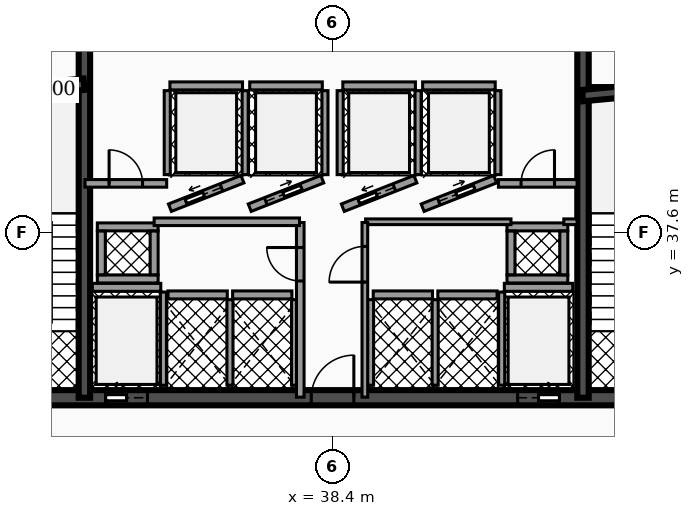
"""IFC4 building model, lengths in metres.
Left out: names, types, materials, properties, quantities, classifications, styles, units other than length and angle.
Written with IfcOpenShell. Run it as: python <this file> out.ifc"""

import sys

from ifc_helpers import new_model, si_unit, direction, frame, frame_2d, origin, place, context, subcontext, project, spatial, rectangle, extrude, element, fill, save


model = new_model("IFC4")
c1 = context("Model", 3, precision=1e-05, world=origin(), true_north=direction((0.0, 1.0)))
c2 = subcontext(c1, "Body", "Model", "MODEL_VIEW")
j1 = project(units=[si_unit("LENGTHUNIT", "METRE"), si_unit("PLANEANGLEUNIT", "RADIAN")], contexts=[c1])
p1 = place(None, origin())
s1 = spatial("IfcSite", under=j1, at=p1, CompositionType="ELEMENT")
p2 = place(p1, origin())
s2 = spatial("IfcBuilding", under=s1, at=p2, CompositionType="ELEMENT")
p3 = place(p2, frame((0.0, 0.0, 84.66)))
s3 = spatial("IfcBuildingStorey", under=s2, at=p3, CompositionType="ELEMENT", Elevation=84.66)
p4 = place(p3, frame((28.4, 33.25, 0.0), z_axis=(0.0, 0.0, 1.0), x_axis=(1.0, 0.0, 0.0)))
e1 = element("IfcWall", 1, at=p4, inside=s3, PredefinedType="SHEAR", context=c2, shape_type="SweptSolid", body=[
    extrude(rectangle(XDim=20.06, YDim=0.4, at=frame_2d((10.03, 0.0))), origin(), (0.0, 0.0, 1.0), 3.82),
])
p5 = place(p4, frame((4.03, 0.0, 0.0)))
e2 = element("IfcOpeningElement", 2, at=p5, cuts=e1, PredefinedType="OPENING", context=c2, shape_type="SweptSolid", body=[
    extrude(rectangle(XDim=1.1, YDim=2.15, at=frame_2d((0.55, 1.075))), frame((0.0, 0.21, 0.0), z_axis=(0.0, -1.0, 0.0), x_axis=(1.0, 0.0, 0.0)), (0.0, 0.0, 1.0), 0.42),
])
p6 = place(p4, frame((14.87, 0.0, 0.0)))
e3 = element("IfcOpeningElement", 3, at=p6, cuts=e1, PredefinedType="OPENING", context=c2, shape_type="SweptSolid", body=[
    extrude(rectangle(XDim=1.1, YDim=2.15, at=frame_2d((0.55, 1.075))), frame((0.0, 0.21, 0.0), z_axis=(0.0, -1.0, 0.0), x_axis=(1.0, 0.0, 0.0)), (0.0, 0.0, 1.0), 0.42),
])
p7 = place(p4, frame((1.31, 0.0, 0.0)))
e4 = element("IfcOpeningElement", 4, at=p7, cuts=e1, PredefinedType="OPENING", context=c2, shape_type="SweptSolid", body=[
    extrude(rectangle(XDim=1.1, YDim=2.2, at=frame_2d((0.55, 1.1))), frame((0.0, 0.21, 0.0), z_axis=(0.0, -1.0, 0.0), x_axis=(1.0, 0.0, 0.0)), (0.0, 0.0, 1.0), 0.42),
])
p8 = place(p4, frame((9.44, 0.0, 0.0)))
e5 = element("IfcOpeningElement", 5, at=p8, cuts=e1, PredefinedType="OPENING", context=c2, shape_type="SweptSolid", body=[
    extrude(rectangle(XDim=1.12, YDim=2.05, at=frame_2d((0.56, 1.025))), frame((0.0, 0.21, 0.0), z_axis=(0.0, -1.0, 0.0), x_axis=(1.0, 0.0, 0.0)), (0.0, 0.0, 1.0), 0.42),
])
p9 = place(p4, frame((17.65, 0.0, 0.0)))
e6 = element("IfcOpeningElement", 6, at=p9, cuts=e1, PredefinedType="OPENING", context=c2, shape_type="SweptSolid", body=[
    extrude(rectangle(XDim=1.1, YDim=2.2, at=frame_2d((0.55, 1.1))), frame((0.0, 0.21, 0.0), z_axis=(0.0, -1.0, 0.0), x_axis=(1.0, 0.0, 0.0)), (0.0, 0.0, 1.0), 0.42),
])
for number, where, z_axis, x_axis in (
    (7, (31.87, 33.25, 0.0), (0.0, 0.0, 1.0), (0.0, 1.0, 0.0)),
    (8, (44.99, 33.25, 0.0), (0.0, 0.0, 1.0), (0.0, 1.0, 0.0)),
):
    element("IfcWall", number, at=place(p3, frame(where, z_axis=z_axis, x_axis=x_axis)), inside=s3, PredefinedType="SHEAR", context=c2, shape_type="SweptSolid", body=[
        extrude(rectangle(XDim=10.2, YDim=0.3, at=frame_2d((5.1, 0.0))), origin(), (0.0, 0.0, 1.0), 3.82),
    ])
p10 = place(p3, frame((28.64, 41.2, 0.0), z_axis=(0.0, 0.0, 1.0), x_axis=(0.995687118776, 0.092774789157, 0.0)))
e9 = element("IfcWall", 9, at=p10, inside=s3, PredefinedType="SHEAR", context=c2, shape_type="SweptSolid", body=[
    extrude(rectangle(XDim=3.234, YDim=0.3, at=frame_2d((1.617, 0.0))), origin(), (0.0, 0.0, 1.0), 3.82),
])
p11 = place(p3, frame((44.98, 41.2, 0.0), z_axis=(0.0, 0.0, 1.0), x_axis=(0.995686468965, 0.09278176286, 0.0)))
e10 = element("IfcWall", 10, at=p11, inside=s3, PredefinedType="SHEAR", context=c2, shape_type="SweptSolid", body=[
    extrude(rectangle(XDim=3.234, YDim=0.3, at=frame_2d((1.617, 0.0))), origin(), (0.0, 0.0, 1.0), 3.82),
])
p12 = place(p3, frame((32.08, 36.155, 0.0), z_axis=(0.0, 0.0, 1.0), x_axis=(1.0, 0.0, 0.0)))
e11 = element("IfcWall", 11, at=p12, inside=s3, PredefinedType="SOLIDWALL", context=c2, shape_type="SweptSolid", body=[
    extrude(rectangle(XDim=1.8, YDim=0.21, at=frame_2d((0.9, 0.0))), origin(), (0.0, 0.0, 1.0), 2.792),
])
p13 = place(p3, frame((33.95, 33.58, 0.0), z_axis=(0.0, 0.0, 1.0), x_axis=(0.0, 1.0, 0.0)))
e12 = element("IfcWall", 12, at=p13, inside=s3, PredefinedType="SOLIDWALL", context=c2, shape_type="SweptSolid", body=[
    extrude(rectangle(XDim=2.45, YDim=0.16, at=frame_2d((1.225, 0.0))), origin(), (0.0, 0.0, 1.0), 2.792),
])
p14 = place(p3, frame((42.92, 36.155, 0.0), z_axis=(0.0, 0.0, 1.0), x_axis=(1.0, 0.0, 0.0)))
e13 = element("IfcWall", 13, at=p14, inside=s3, PredefinedType="SOLIDWALL", context=c2, shape_type="SweptSolid", body=[
    extrude(rectangle(XDim=1.8, YDim=0.21, at=frame_2d((0.9, 0.0))), origin(), (0.0, 0.0, 1.0), 2.792),
])
p15 = place(p3, frame((42.85, 33.58, 0.0), z_axis=(0.0, 0.0, 1.0), x_axis=(0.0, 1.0, 0.0)))
e14 = element("IfcWall", 14, at=p15, inside=s3, PredefinedType="SOLIDWALL", context=c2, shape_type="SweptSolid", body=[
    extrude(rectangle(XDim=2.45, YDim=0.16, at=frame_2d((1.225, 0.0))), origin(), (0.0, 0.0, 1.0), 2.792),
])
p16 = place(p3, frame((34.12, 38.25, 0.0), z_axis=(0.0, 0.0, 1.0), x_axis=(0.930804993012, 0.36551616241, 0.0)))
e15 = element("IfcWall", 15, at=p16, inside=s3, PredefinedType="SOLIDWALL", context=c2, shape_type="SweptSolid", body=[
    extrude(rectangle(XDim=2.052, YDim=0.21, at=frame_2d((1.026, 0.0))), origin(), (0.0, 0.0, 1.0), 2.792),
])
p17 = place(p16, frame((0.455, 0.0, 0.0)))
e16 = element("IfcOpeningElement", 16, at=p17, cuts=e15, PredefinedType="OPENING", context=c2, shape_type="SweptSolid", body=[
    extrude(rectangle(XDim=1.0, YDim=2.1, at=frame_2d((0.5, 1.05))), frame((0.0, 0.115, 0.0), z_axis=(0.0, -1.0, 0.0), x_axis=(1.0, 0.0, 0.0)), (0.0, 0.0, 1.0), 0.23),
])
p18 = place(p3, frame((34.12, 41.455, 0.0), z_axis=(0.0, 0.0, 1.0), x_axis=(1.0, 0.0, 0.0)))
e17 = element("IfcWall", 17, at=p18, inside=s3, PredefinedType="SOLIDWALL", context=c2, shape_type="SweptSolid", body=[
    extrude(rectangle(XDim=1.91, YDim=0.21, at=frame_2d((0.955, 0.0))), origin(), (0.0, 0.0, 1.0), 2.792),
])
for number, where, z_axis, x_axis in (
    (18, (34.05, 39.12, 0.0), (0.0, 0.0, 1.0), (0.0, 1.0, 0.0)),
    (19, (36.1, 39.12, 0.0), (0.0, 0.0, 1.0), (0.0, 1.0, 0.0)),
):
    element("IfcWall", number, at=place(p3, frame(where, z_axis=z_axis, x_axis=x_axis)), inside=s3, PredefinedType="SOLIDWALL", context=c2, shape_type="SweptSolid", body=[
        extrude(rectangle(XDim=2.21, YDim=0.16, at=frame_2d((1.105, 0.0))), origin(), (0.0, 0.0, 1.0), 2.792),
    ])
p19 = place(p3, frame((36.22, 38.25, 0.0), z_axis=(0.0, 0.0, 1.0), x_axis=(0.930804993012, 0.36551616241, 0.0)))
e20 = element("IfcWall", 20, at=p19, inside=s3, PredefinedType="SOLIDWALL", context=c2, shape_type="SweptSolid", body=[
    extrude(rectangle(XDim=2.052, YDim=0.21, at=frame_2d((1.026, 0.0))), origin(), (0.0, 0.0, 1.0), 2.792),
])
p20 = place(p19, frame((0.455, 0.0, 0.0)))
e21 = element("IfcOpeningElement", 21, at=p20, cuts=e20, PredefinedType="OPENING", context=c2, shape_type="SweptSolid", body=[
    extrude(rectangle(XDim=1.0, YDim=2.1, at=frame_2d((0.5, 1.05))), frame((0.0, 0.115, 0.0), z_axis=(0.0, -1.0, 0.0), x_axis=(1.0, 0.0, 0.0)), (0.0, 0.0, 1.0), 0.23),
])
p21 = place(p3, frame((36.22, 41.455, 0.0), z_axis=(0.0, 0.0, 1.0), x_axis=(1.0, 0.0, 0.0)))
e22 = element("IfcWall", 22, at=p21, inside=s3, PredefinedType="SOLIDWALL", context=c2, shape_type="SweptSolid", body=[
    extrude(rectangle(XDim=1.91, YDim=0.21, at=frame_2d((0.955, 0.0))), origin(), (0.0, 0.0, 1.0), 2.792),
])
p22 = place(p3, frame((38.2, 39.12, 0.0), z_axis=(0.0, 0.0, 1.0), x_axis=(0.0, 1.0, 0.0)))
e23 = element("IfcWall", 23, at=p22, inside=s3, PredefinedType="SOLIDWALL", context=c2, shape_type="SweptSolid", body=[
    extrude(rectangle(XDim=2.21, YDim=0.16, at=frame_2d((1.105, 0.0))), origin(), (0.0, 0.0, 1.0), 2.792),
])
p23 = place(p3, frame((38.67, 38.25, 0.0), z_axis=(0.0, 0.0, 1.0), x_axis=(0.930820886763, 0.3654756856, 0.0)))
e24 = element("IfcWall", 24, at=p23, inside=s3, PredefinedType="SOLIDWALL", context=c2, shape_type="SweptSolid", body=[
    extrude(rectangle(XDim=2.052, YDim=0.21, at=frame_2d((1.026, 0.0))), origin(), (0.0, 0.0, 1.0), 2.792),
])
p24 = place(p23, frame((0.455, 0.0, 0.0)))
e25 = element("IfcOpeningElement", 25, at=p24, cuts=e24, PredefinedType="OPENING", context=c2, shape_type="SweptSolid", body=[
    extrude(rectangle(XDim=1.0, YDim=2.1, at=frame_2d((0.5, 1.05))), frame((0.0, 0.115, 0.0), z_axis=(0.0, -1.0, 0.0), x_axis=(1.0, 0.0, 0.0)), (0.0, 0.0, 1.0), 0.23),
])
p25 = place(p3, frame((38.67, 41.455, 0.0), z_axis=(0.0, 0.0, 1.0), x_axis=(1.0, 0.0, 0.0)))
e26 = element("IfcWall", 26, at=p25, inside=s3, PredefinedType="SOLIDWALL", context=c2, shape_type="SweptSolid", body=[
    extrude(rectangle(XDim=1.91, YDim=0.21, at=frame_2d((0.955, 0.0))), origin(), (0.0, 0.0, 1.0), 2.792),
])
for number, where, z_axis, x_axis in (
    (27, (38.6, 39.12, 0.0), (0.0, 0.0, 1.0), (0.0, 1.0, 0.0)),
    (28, (40.65, 39.12, 0.0), (0.0, 0.0, 1.0), (0.0, 1.0, 0.0)),
):
    element("IfcWall", number, at=place(p3, frame(where, z_axis=z_axis, x_axis=x_axis)), inside=s3, PredefinedType="SOLIDWALL", context=c2, shape_type="SweptSolid", body=[
        extrude(rectangle(XDim=2.21, YDim=0.16, at=frame_2d((1.105, 0.0))), origin(), (0.0, 0.0, 1.0), 2.792),
    ])
p26 = place(p3, frame((40.77, 38.25, 0.0), z_axis=(0.0, 0.0, 1.0), x_axis=(0.930804993012, 0.36551616241, 0.0)))
e29 = element("IfcWall", 29, at=p26, inside=s3, PredefinedType="SOLIDWALL", context=c2, shape_type="SweptSolid", body=[
    extrude(rectangle(XDim=2.052, YDim=0.21, at=frame_2d((1.026, 0.0))), origin(), (0.0, 0.0, 1.0), 2.792),
])
p27 = place(p26, frame((0.455, 0.0, 0.0)))
e30 = element("IfcOpeningElement", 30, at=p27, cuts=e29, PredefinedType="OPENING", context=c2, shape_type="SweptSolid", body=[
    extrude(rectangle(XDim=1.0, YDim=2.1, at=frame_2d((0.5, 1.05))), frame((0.0, 0.115, 0.0), z_axis=(0.0, -1.0, 0.0), x_axis=(1.0, 0.0, 0.0)), (0.0, 0.0, 1.0), 0.23),
])
p28 = place(p3, frame((40.77, 41.455, 0.0), z_axis=(0.0, 0.0, 1.0), x_axis=(1.0, 0.0, 0.0)))
e31 = element("IfcWall", 31, at=p28, inside=s3, PredefinedType="SOLIDWALL", context=c2, shape_type="SweptSolid", body=[
    extrude(rectangle(XDim=1.91, YDim=0.21, at=frame_2d((0.955, 0.0))), origin(), (0.0, 0.0, 1.0), 2.792),
])
p29 = place(p3, frame((42.75, 39.12, 0.0), z_axis=(0.0, 0.0, 1.0), x_axis=(0.0, 1.0, 0.0)))
e32 = element("IfcWall", 32, at=p29, inside=s3, PredefinedType="SOLIDWALL", context=c2, shape_type="SweptSolid", body=[
    extrude(rectangle(XDim=2.21, YDim=0.16, at=frame_2d((1.105, 0.0))), origin(), (0.0, 0.0, 1.0), 2.792),
])
p30 = place(p3, frame((34.07, 35.955, 0.0), z_axis=(0.0, 0.0, 1.0), x_axis=(1.0, 0.0, 0.0)))
e33 = element("IfcWall", 33, at=p30, inside=s3, PredefinedType="SOLIDWALL", context=c2, shape_type="SweptSolid", body=[
    extrude(rectangle(XDim=1.56, YDim=0.21, at=frame_2d((0.78, 0.0))), origin(), (0.0, 0.0, 1.0), 2.792),
])
p31 = place(p3, frame((35.7, 33.58, 0.0), z_axis=(0.0, 0.0, 1.0), x_axis=(0.0, 1.0, 0.0)))
e34 = element("IfcWall", 34, at=p31, inside=s3, PredefinedType="SOLIDWALL", context=c2, shape_type="SweptSolid", body=[
    extrude(rectangle(XDim=2.25, YDim=0.16, at=frame_2d((1.125, 0.0))), origin(), (0.0, 0.0, 1.0), 2.792),
])
p32 = place(p3, frame((35.77, 35.955, 0.0), z_axis=(0.0, 0.0, 1.0), x_axis=(1.0, 0.0, 0.0)))
e35 = element("IfcWall", 35, at=p32, inside=s3, PredefinedType="SOLIDWALL", context=c2, shape_type="SweptSolid", body=[
    extrude(rectangle(XDim=1.56, YDim=0.21, at=frame_2d((0.78, 0.0))), origin(), (0.0, 0.0, 1.0), 2.792),
])
p33 = place(p3, frame((37.4, 33.58, 0.0), z_axis=(0.0, 0.0, 1.0), x_axis=(0.0, 1.0, 0.0)))
e36 = element("IfcWall", 36, at=p33, inside=s3, PredefinedType="SOLIDWALL", context=c2, shape_type="SweptSolid", body=[
    extrude(rectangle(XDim=2.25, YDim=0.16, at=frame_2d((1.125, 0.0))), origin(), (0.0, 0.0, 1.0), 2.792),
])
p34 = place(p3, frame((39.47, 35.955, 0.0), z_axis=(0.0, 0.0, 1.0), x_axis=(1.0, 0.0, 0.0)))
e37 = element("IfcWall", 37, at=p34, inside=s3, PredefinedType="SOLIDWALL", context=c2, shape_type="SweptSolid", body=[
    extrude(rectangle(XDim=1.56, YDim=0.21, at=frame_2d((0.78, 0.0))), origin(), (0.0, 0.0, 1.0), 2.792),
])
for number, where, z_axis, x_axis in (
    (38, (39.4, 33.58, 0.0), (0.0, 0.0, 1.0), (0.0, 1.0, 0.0)),
    (39, (41.1, 33.58, 0.0), (0.0, 0.0, 1.0), (0.0, 1.0, 0.0)),
):
    element("IfcWall", number, at=place(p3, frame(where, z_axis=z_axis, x_axis=x_axis)), inside=s3, PredefinedType="SOLIDWALL", context=c2, shape_type="SweptSolid", body=[
        extrude(rectangle(XDim=2.25, YDim=0.16, at=frame_2d((1.125, 0.0))), origin(), (0.0, 0.0, 1.0), 2.792),
    ])
p35 = place(p3, frame((41.17, 35.955, 0.0), z_axis=(0.0, 0.0, 1.0), x_axis=(1.0, 0.0, 0.0)))
e40 = element("IfcWall", 40, at=p35, inside=s3, PredefinedType="SOLIDWALL", context=c2, shape_type="SweptSolid", body=[
    extrude(rectangle(XDim=1.56, YDim=0.21, at=frame_2d((0.78, 0.0))), origin(), (0.0, 0.0, 1.0), 2.792),
])
for number, where, z_axis, x_axis in (
    (41, (32.21, 36.375, 0.0), (0.0, 0.0, 1.0), (1.0, 0.0, 0.0)),
    (42, (32.21, 37.745, 0.0), (0.0, 0.0, 1.0), (1.0, 0.0, 0.0)),
):
    element("IfcWall", number, at=place(p3, frame(where, z_axis=z_axis, x_axis=x_axis)), inside=s3, PredefinedType="SOLIDWALL", context=c2, shape_type="SweptSolid", body=[
        extrude(rectangle(XDim=1.6, YDim=0.21, at=frame_2d((0.8, 0.0))), origin(), (0.0, 0.0, 1.0), 3.82),
    ])
for number, where, z_axis, x_axis in (
    (43, (32.315, 36.485, 0.0), (0.0, 0.0, 1.0), (0.0, 1.0, 0.0)),
    (44, (33.705, 36.485, 0.0), (0.0, 0.0, 1.0), (0.0, 1.0, 0.0)),
):
    element("IfcWall", number, at=place(p3, frame(where, z_axis=z_axis, x_axis=x_axis)), inside=s3, PredefinedType="SOLIDWALL", context=c2, shape_type="SweptSolid", body=[
        extrude(rectangle(XDim=1.15, YDim=0.21, at=frame_2d((0.575, 0.0))), origin(), (0.0, 0.0, 1.0), 3.82),
    ])
for number, where, z_axis, x_axis in (
    (45, (42.99, 36.375, 0.0), (0.0, 0.0, 1.0), (1.0, 0.0, 0.0)),
    (46, (42.99, 37.745, 0.0), (0.0, 0.0, 1.0), (1.0, 0.0, 0.0)),
):
    element("IfcWall", number, at=place(p3, frame(where, z_axis=z_axis, x_axis=x_axis)), inside=s3, PredefinedType="SOLIDWALL", context=c2, shape_type="SweptSolid", body=[
        extrude(rectangle(XDim=1.6, YDim=0.21, at=frame_2d((0.8, 0.0))), origin(), (0.0, 0.0, 1.0), 3.82),
    ])
for number, where, z_axis, x_axis in (
    (47, (43.095, 36.485, 0.0), (0.0, 0.0, 1.0), (0.0, 1.0, 0.0)),
    (48, (44.485, 36.485, 0.0), (0.0, 0.0, 1.0), (0.0, 1.0, 0.0)),
):
    element("IfcWall", number, at=place(p3, frame(where, z_axis=z_axis, x_axis=x_axis)), inside=s3, PredefinedType="SOLIDWALL", context=c2, shape_type="SweptSolid", body=[
        extrude(rectangle(XDim=1.15, YDim=0.21, at=frame_2d((0.575, 0.0))), origin(), (0.0, 0.0, 1.0), 3.82),
    ])
p36 = place(p3, frame((37.55, 33.265, 0.0), z_axis=(0.0, 0.0, 1.0), x_axis=(0.0, 1.0, 0.0)))
e49 = element("IfcWall", 49, at=p36, inside=s3, PredefinedType="PARTITIONING", context=c2, shape_type="SweptSolid", body=[
    extrude(rectangle(XDim=4.595, YDim=0.2, at=frame_2d((2.298, 0.0))), origin(), (0.0, 0.0, 1.0), 2.777),
])
p37 = place(p36, frame((3.058, 0.0, 0.0)))
e50 = element("IfcOpeningElement", 50, at=p37, cuts=e49, PredefinedType="OPENING", context=c2, shape_type="SweptSolid", body=[
    extrude(rectangle(XDim=0.88, YDim=2.05, at=frame_2d((0.44, 1.025))), frame((0.0, 0.11, 0.0), z_axis=(0.0, -1.0, 0.0), x_axis=(1.0, 0.0, 0.0)), (0.0, 0.0, 1.0), 0.22),
])
p38 = place(p3, frame((33.705, 37.88, 0.0), z_axis=(0.0, 0.0, 1.0), x_axis=(1.0, 0.0, 0.0)))
e51 = element("IfcWall", 51, at=p38, inside=s3, PredefinedType="PARTITIONING", context=c2, shape_type="SweptSolid", body=[
    extrude(rectangle(XDim=3.825, YDim=0.2, at=frame_2d((1.913, 0.0))), origin(), (0.0, 0.0, 1.0), 2.777),
])
p39 = place(p3, frame((31.885, 38.89, 0.0), z_axis=(0.0, 0.0, 1.0), x_axis=(1.0, 0.0, 0.0)))
e52 = element("IfcWall", 52, at=p39, inside=s3, PredefinedType="PARTITIONING", context=c2, shape_type="SweptSolid", body=[
    extrude(rectangle(XDim=2.15, YDim=0.2, at=frame_2d((1.075, 0.0))), origin(), (0.0, 0.0, 1.0), 2.777),
])
p40 = place(p39, frame((0.635, 0.0, 0.0)))
e53 = element("IfcOpeningElement", 53, at=p40, cuts=e52, PredefinedType="OPENING", context=c2, shape_type="SweptSolid", body=[
    extrude(rectangle(XDim=0.88, YDim=2.05, at=frame_2d((0.44, 1.025))), frame((0.0, 0.11, 0.0), z_axis=(0.0, -1.0, 0.0), x_axis=(1.0, 0.0, 0.0)), (0.0, 0.0, 1.0), 0.22),
])
p41 = place(p3, frame((42.765, 38.89, 0.0), z_axis=(0.0, 0.0, 1.0), x_axis=(1.0, 0.0, 0.0)))
e54 = element("IfcWall", 54, at=p41, inside=s3, PredefinedType="PARTITIONING", context=c2, shape_type="SweptSolid", body=[
    extrude(rectangle(XDim=2.07, YDim=0.2, at=frame_2d((1.035, 0.0))), origin(), (0.0, 0.0, 1.0), 2.777),
])
p42 = place(p41, frame((0.595, 0.0, 0.0)))
e55 = element("IfcOpeningElement", 55, at=p42, cuts=e54, PredefinedType="OPENING", context=c2, shape_type="SweptSolid", body=[
    extrude(rectangle(XDim=0.88, YDim=2.05, at=frame_2d((0.44, 1.025))), frame((0.0, 0.11, 0.0), z_axis=(0.0, -1.0, 0.0), x_axis=(1.0, 0.0, 0.0)), (0.0, 0.0, 1.0), 0.22),
])
p43 = place(p3, frame((39.27, 37.88, 0.0), z_axis=(0.0, 0.0, 1.0), x_axis=(1.0, 0.0, 0.0)))
e56 = element("IfcWall", 56, at=p43, inside=s3, PredefinedType="PARTITIONING", context=c2, shape_type="SweptSolid", body=[
    extrude(rectangle(XDim=3.825, YDim=0.15, at=frame_2d((1.913, 0.0))), origin(), (0.0, 0.0, 1.0), 2.777),
])
p44 = place(p3, frame((44.485, 37.88, 0.0), z_axis=(0.0, 0.0, 1.0), x_axis=(1.0, 0.0, 0.0)))
e57 = element("IfcWall", 57, at=p44, inside=s3, PredefinedType="PARTITIONING", context=c2, shape_type="SweptSolid", body=[
    extrude(rectangle(XDim=0.35, YDim=0.15, at=frame_2d((0.175, 0.0))), origin(), (0.0, 0.0, 1.0), 2.777),
])
p45 = place(p3, frame((39.25, 33.265, 0.0), z_axis=(0.0, 0.0, 1.0), x_axis=(0.0, 1.0, 0.0)))
e58 = element("IfcWall", 58, at=p45, inside=s3, PredefinedType="PARTITIONING", context=c2, shape_type="SweptSolid", body=[
    extrude(rectangle(XDim=4.595, YDim=0.15, at=frame_2d((2.298, 0.0))), origin(), (0.0, 0.0, 1.0), 2.777),
])
p46 = place(p45, frame((3.028, 0.0, 0.0)))
e59 = element("IfcOpeningElement", 59, at=p46, cuts=e58, PredefinedType="OPENING", context=c2, shape_type="SweptSolid", body=[
    extrude(rectangle(XDim=0.94, YDim=2.05, at=frame_2d((0.47, 1.025))), frame((0.0, 0.085, 0.0), z_axis=(0.0, -1.0, 0.0), x_axis=(1.0, 0.0, 0.0)), (0.0, 0.0, 1.0), 0.17),
])
p47 = place(p5, origin())
e60 = element("IfcDoor", 60, at=p47, inside=s3, OperationType="SLIDING_TO_LEFT", PredefinedType="DOOR", context=c2, shape_type="SweptSolid", body=[
    extrude(rectangle(XDim=1.1, YDim=2.15, at=frame_2d((0.55, 1.075))), frame((0.0, 0.025, 0.0), z_axis=(0.0, -1.0, 0.0), x_axis=(1.0, 0.0, 0.0)), (0.0, 0.0, 1.0), 0.05),
])
fill(e2, e60)
p48 = place(p6, origin())
e61 = element("IfcDoor", 61, at=p48, inside=s3, OperationType="SLIDING_TO_RIGHT", PredefinedType="DOOR", context=c2, shape_type="SweptSolid", body=[
    extrude(rectangle(XDim=1.1, YDim=2.15, at=frame_2d((0.55, 1.075))), frame((0.0, 0.025, 0.0), z_axis=(0.0, -1.0, 0.0), x_axis=(1.0, 0.0, 0.0)), (0.0, 0.0, 1.0), 0.05),
])
fill(e3, e61)
p49 = place(p17, origin())
e62 = element("IfcDoor", 62, at=p49, inside=s3, OperationType="SLIDING_TO_LEFT", PredefinedType="DOOR", context=c2, shape_type="SweptSolid", body=[
    extrude(rectangle(XDim=1.0, YDim=2.1, at=frame_2d((0.5, 1.05))), frame((0.0, 0.025, 0.0), z_axis=(0.0, -1.0, 0.0), x_axis=(1.0, 0.0, 0.0)), (0.0, 0.0, 1.0), 0.05),
])
fill(e16, e62)
p50 = place(p20, origin())
e63 = element("IfcDoor", 63, at=p50, inside=s3, OperationType="SLIDING_TO_RIGHT", PredefinedType="DOOR", context=c2, shape_type="SweptSolid", body=[
    extrude(rectangle(XDim=1.0, YDim=2.1, at=frame_2d((0.5, 1.05))), frame((0.0, 0.025, 0.0), z_axis=(0.0, -1.0, 0.0), x_axis=(1.0, 0.0, 0.0)), (0.0, 0.0, 1.0), 0.05),
])
fill(e21, e63)
p51 = place(p24, origin())
e64 = element("IfcDoor", 64, at=p51, inside=s3, OperationType="SLIDING_TO_LEFT", PredefinedType="DOOR", context=c2, shape_type="SweptSolid", body=[
    extrude(rectangle(XDim=1.0, YDim=2.1, at=frame_2d((0.5, 1.05))), frame((0.0, 0.025, 0.0), z_axis=(0.0, -1.0, 0.0), x_axis=(1.0, 0.0, 0.0)), (0.0, 0.0, 1.0), 0.05),
])
fill(e25, e64)
p52 = place(p27, origin())
e65 = element("IfcDoor", 65, at=p52, inside=s3, OperationType="SLIDING_TO_RIGHT", PredefinedType="DOOR", context=c2, shape_type="SweptSolid", body=[
    extrude(rectangle(XDim=1.0, YDim=2.1, at=frame_2d((0.5, 1.05))), frame((0.0, 0.025, 0.0), z_axis=(0.0, -1.0, 0.0), x_axis=(1.0, 0.0, 0.0)), (0.0, 0.0, 1.0), 0.05),
])
fill(e30, e65)
p53 = place(p8, origin())
e66 = element("IfcDoor", 66, at=p53, inside=s3, OperationType="SINGLE_SWING_RIGHT", PredefinedType="DOOR", context=c2, shape_type="SweptSolid", body=[
    extrude(rectangle(XDim=1.12, YDim=2.05, at=frame_2d((0.56, 1.025))), frame((0.0, 0.025, 0.0), z_axis=(0.0, -1.0, 0.0), x_axis=(1.0, 0.0, 0.0)), (0.0, 0.0, 1.0), 0.05),
])
fill(e5, e66)
p54 = place(p37, origin())
e67 = element("IfcDoor", 67, at=p54, inside=s3, OperationType="SINGLE_SWING_RIGHT", PredefinedType="DOOR", context=c2, shape_type="SweptSolid", body=[
    extrude(rectangle(XDim=0.88, YDim=2.05, at=frame_2d((0.44, 1.025))), frame((0.0, 0.025, 0.0), z_axis=(0.0, -1.0, 0.0), x_axis=(1.0, 0.0, 0.0)), (0.0, 0.0, 1.0), 0.05),
])
fill(e50, e67)
p55 = place(p40, origin())
e68 = element("IfcDoor", 68, at=p55, inside=s3, OperationType="SINGLE_SWING_LEFT", PredefinedType="DOOR", context=c2, shape_type="SweptSolid", body=[
    extrude(rectangle(XDim=0.88, YDim=2.05, at=frame_2d((0.44, 1.025))), frame((0.0, 0.025, 0.0), z_axis=(0.0, -1.0, 0.0), x_axis=(1.0, 0.0, 0.0)), (0.0, 0.0, 1.0), 0.05),
])
fill(e53, e68)
p56 = place(p42, origin())
e69 = element("IfcDoor", 69, at=p56, inside=s3, OperationType="SINGLE_SWING_RIGHT", PredefinedType="DOOR", context=c2, shape_type="SweptSolid", body=[
    extrude(rectangle(XDim=0.88, YDim=2.05, at=frame_2d((0.44, 1.025))), frame((0.0, 0.025, 0.0), z_axis=(0.0, -1.0, 0.0), x_axis=(1.0, 0.0, 0.0)), (0.0, 0.0, 1.0), 0.05),
])
fill(e55, e69)
p57 = place(p46, origin())
e70 = element("IfcDoor", 70, at=p57, inside=s3, OperationType="SINGLE_SWING_LEFT", PredefinedType="DOOR", context=c2, shape_type="SweptSolid", body=[
    extrude(rectangle(XDim=0.94, YDim=2.05, at=frame_2d((0.47, 1.025))), frame((0.0, 0.025, 0.0), z_axis=(0.0, -1.0, 0.0), x_axis=(1.0, 0.0, 0.0)), (0.0, 0.0, 1.0), 0.05),
])
fill(e59, e70)
save(model, sys.argv[1])
